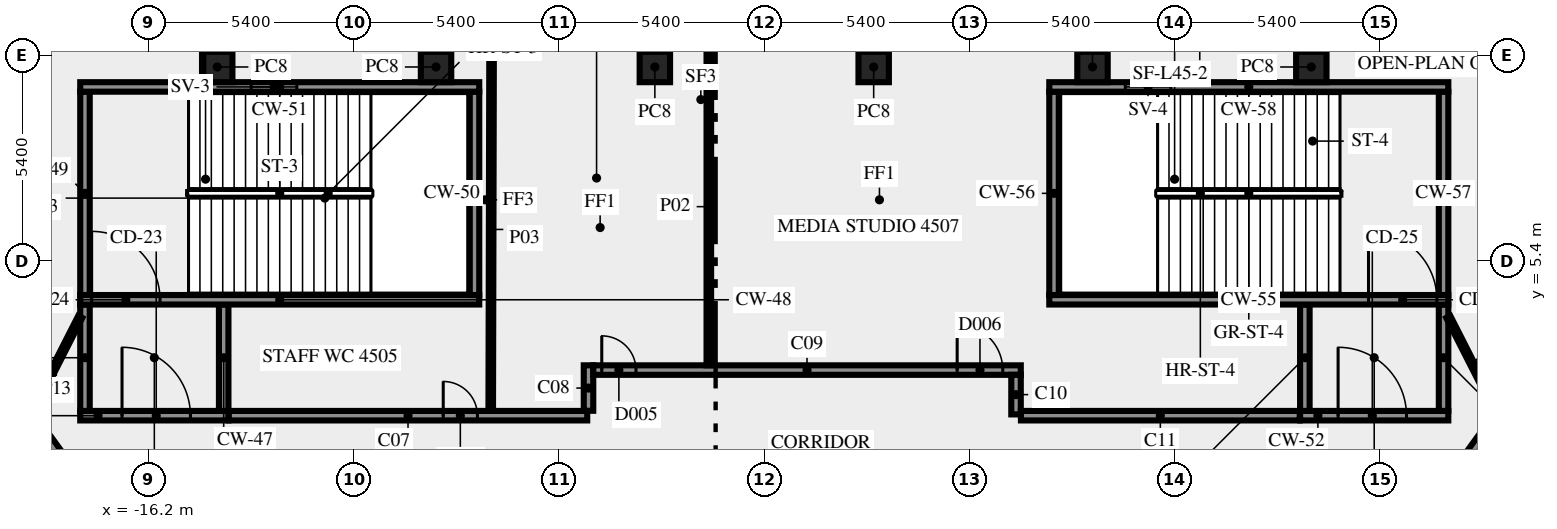
"""IFC4 building model, lengths in metres.
Left out: names, types, materials, properties, quantities, classifications, styles, units other than length and angle.
Written with IfcOpenShell. Run it as: python <this file> out.ifc"""

import sys

from ifc_helpers import new_model, si_unit, direction, frame, frame_2d, origin, origin_2d, place, context, subcontext, project, spatial, rectangle, extrude, element, fill, save


model = new_model("IFC4")
c1 = context("Model", 3, precision=1e-05, world=origin(), true_north=direction((0.0, 1.0)))
c2 = subcontext(c1, "Body", "Model", "MODEL_VIEW")
j1 = project(units=[si_unit("LENGTHUNIT", "METRE"), si_unit("PLANEANGLEUNIT", "RADIAN")], contexts=[c1])
p1 = place(None, origin())
s1 = spatial("IfcSite", under=j1, at=p1, CompositionType="ELEMENT")
p2 = place(p1, origin())
s2 = spatial("IfcBuilding", under=s1, at=p2, CompositionType="ELEMENT")
p3 = place(p2, frame((0.0, 0.0, 194.0)))
s3 = spatial("IfcBuildingStorey", under=s2, at=p3, CompositionType="ELEMENT", Elevation=194.0)
for number, where, z_axis, x_axis in (
    (1, (14.395, 10.5, 0.0), (0.0, 0.0, 1.0), (-1.0, 0.0, 0.0)),
    (2, (8.637, 10.5, 0.0), (0.0, 0.0, 1.0), (-1.0, 0.0, 0.0)),
    (3, (2.879, 10.5, 0.0), (0.0, 0.0, 1.0), (-1.0, 0.0, 0.0)),
    (4, (-2.879, 10.5, 0.0), (0.0, 0.0, 1.0), (-1.0, 0.0, 0.0)),
    (5, (-8.637, 10.5, 0.0), (0.0, 0.0, 1.0), (-1.0, 0.0, 0.0)),
    (6, (-14.395, 10.5, 0.0), (0.0, 0.0, 1.0), (-1.0, 0.0, 0.0)),
):
    element("IfcColumn", number, at=place(p3, frame(where, z_axis=z_axis, x_axis=x_axis)), inside=s3, PredefinedType="COLUMN", context=c2, shape_type="SweptSolid", body=[
        extrude(rectangle(XDim=0.8, YDim=0.8, at=origin_2d()), origin(), (0.0, 0.0, 1.0), 3.65),
    ])
p4 = place(p3, frame((-18.0, 1.325, 0.0), z_axis=(0.0, 0.0, 1.0), x_axis=(1.0, 0.0, 0.0)))
e7 = element("IfcWall", 7, at=p4, inside=s3, PredefinedType="SHEAR", context=c2, shape_type="SweptSolid", body=[
    extrude(rectangle(XDim=3.9, YDim=0.25, at=frame_2d((1.95, 0.0))), origin(), (0.0, 0.0, 1.0), 3.65),
])
p5 = place(p4, frame((1.1, 0.0, 0.0)))
e8 = element("IfcOpeningElement", 8, at=p5, cuts=e7, PredefinedType="OPENING", context=c2, shape_type="SweptSolid", body=[
    extrude(rectangle(XDim=1.8, YDim=2.1, at=frame_2d((0.9, 1.05))), frame((0.0, 0.135, 0.0), z_axis=(0.0, -1.0, 0.0), x_axis=(1.0, 0.0, 0.0)), (0.0, 0.0, 1.0), 0.27),
])
for number, where, z_axis, x_axis in (
    (9, (-17.875, 1.45, 0.0), (0.0, 0.0, 1.0), (0.0, 1.0, 0.0)),
    (10, (-14.225, 1.45, 0.0), (0.0, 0.0, 1.0), (0.0, 1.0, 0.0)),
):
    element("IfcWall", number, at=place(p3, frame(where, z_axis=z_axis, x_axis=x_axis)), inside=s3, PredefinedType="SHEAR", context=c2, shape_type="SweptSolid", body=[
        extrude(rectangle(XDim=2.8, YDim=0.25, at=frame_2d((1.4, 0.0))), origin(), (0.0, 0.0, 1.0), 3.65),
    ])
p6 = place(p3, frame((-18.0, 4.375, 0.0), z_axis=(0.0, 0.0, 1.0), x_axis=(1.0, 0.0, 0.0)))
e11 = element("IfcWall", 11, at=p6, inside=s3, PredefinedType="SHEAR", context=c2, shape_type="SweptSolid", body=[
    extrude(rectangle(XDim=10.5, YDim=0.25, at=frame_2d((5.25, 0.0))), origin(), (0.0, 0.0, 1.0), 3.65),
])
p7 = place(p6, frame((0.3, 0.0, 0.0)))
e12 = element("IfcOpeningElement", 12, at=p7, cuts=e11, PredefinedType="OPENING", context=c2, shape_type="SweptSolid", body=[
    extrude(rectangle(XDim=1.8, YDim=2.1, at=frame_2d((0.9, 1.05))), frame((0.0, 0.135, 0.0), z_axis=(0.0, -1.0, 0.0), x_axis=(1.0, 0.0, 0.0)), (0.0, 0.0, 1.0), 0.27),
])
for number, where, z_axis, x_axis in (
    (13, (-17.875, 4.5, 0.0), (0.0, 0.0, 1.0), (0.0, 1.0, 0.0)),
    (14, (-7.625, 4.5, 0.0), (0.0, 0.0, 1.0), (0.0, 1.0, 0.0)),
):
    element("IfcWall", number, at=place(p3, frame(where, z_axis=z_axis, x_axis=x_axis)), inside=s3, PredefinedType="SHEAR", context=c2, shape_type="SweptSolid", body=[
        extrude(rectangle(XDim=5.35, YDim=0.25, at=frame_2d((2.675, 0.0))), origin(), (0.0, 0.0, 1.0), 3.65),
    ])
p8 = place(p3, frame((-18.0, 9.975, 0.0), z_axis=(0.0, 0.0, 1.0), x_axis=(1.0, 0.0, 0.0)))
e15 = element("IfcWall", 15, at=p8, inside=s3, PredefinedType="SHEAR", context=c2, shape_type="SweptSolid", body=[
    extrude(rectangle(XDim=10.5, YDim=0.25, at=frame_2d((5.25, 0.0))), origin(), (0.0, 0.0, 1.0), 3.65),
])
p9 = place(p8, frame((4.5, 0.0, 1.0)))
e16 = element("IfcOpeningElement", 16, at=p9, cuts=e15, PredefinedType="OPENING", context=c2, shape_type="SweptSolid", body=[
    extrude(rectangle(XDim=1.2, YDim=1.2, at=frame_2d((0.6, 0.6))), frame((0.0, 0.135, 0.0), z_axis=(0.0, -1.0, 0.0), x_axis=(1.0, 0.0, 0.0)), (0.0, 0.0, 1.0), 0.27),
])
p10 = place(p3, frame((14.1, 1.325, 0.0), z_axis=(0.0, 0.0, 1.0), x_axis=(1.0, 0.0, 0.0)))
e17 = element("IfcWall", 17, at=p10, inside=s3, PredefinedType="SHEAR", context=c2, shape_type="SweptSolid", body=[
    extrude(rectangle(XDim=3.9, YDim=0.25, at=frame_2d((1.95, 0.0))), origin(), (0.0, 0.0, 1.0), 3.65),
])
p11 = place(p10, frame((1.0, 0.0, 0.0)))
e18 = element("IfcOpeningElement", 18, at=p11, cuts=e17, PredefinedType="OPENING", context=c2, shape_type="SweptSolid", body=[
    extrude(rectangle(XDim=1.8, YDim=2.1, at=frame_2d((0.9, 1.05))), frame((0.0, 0.135, 0.0), z_axis=(0.0, -1.0, 0.0), x_axis=(1.0, 0.0, 0.0)), (0.0, 0.0, 1.0), 0.27),
])
for number, where, z_axis, x_axis in (
    (19, (14.225, 1.45, 0.0), (0.0, 0.0, 1.0), (0.0, 1.0, 0.0)),
    (20, (17.875, 1.45, 0.0), (0.0, 0.0, 1.0), (0.0, 1.0, 0.0)),
):
    element("IfcWall", number, at=place(p3, frame(where, z_axis=z_axis, x_axis=x_axis)), inside=s3, PredefinedType="SHEAR", context=c2, shape_type="SweptSolid", body=[
        extrude(rectangle(XDim=2.8, YDim=0.25, at=frame_2d((1.4, 0.0))), origin(), (0.0, 0.0, 1.0), 3.65),
    ])
p12 = place(p3, frame((7.5, 4.375, 0.0), z_axis=(0.0, 0.0, 1.0), x_axis=(1.0, 0.0, 0.0)))
e21 = element("IfcWall", 21, at=p12, inside=s3, PredefinedType="SHEAR", context=c2, shape_type="SweptSolid", body=[
    extrude(rectangle(XDim=10.5, YDim=0.25, at=frame_2d((5.25, 0.0))), origin(), (0.0, 0.0, 1.0), 3.65),
])
p13 = place(p12, frame((8.4, 0.0, 0.0)))
e22 = element("IfcOpeningElement", 22, at=p13, cuts=e21, PredefinedType="OPENING", context=c2, shape_type="SweptSolid", body=[
    extrude(rectangle(XDim=1.8, YDim=2.1, at=frame_2d((0.9, 1.05))), frame((0.0, 0.135, 0.0), z_axis=(0.0, -1.0, 0.0), x_axis=(1.0, 0.0, 0.0)), (0.0, 0.0, 1.0), 0.27),
])
for number, where, z_axis, x_axis in (
    (23, (7.625, 4.5, 0.0), (0.0, 0.0, 1.0), (0.0, 1.0, 0.0)),
    (24, (17.875, 4.5, 0.0), (0.0, 0.0, 1.0), (0.0, 1.0, 0.0)),
):
    element("IfcWall", number, at=place(p3, frame(where, z_axis=z_axis, x_axis=x_axis)), inside=s3, PredefinedType="SHEAR", context=c2, shape_type="SweptSolid", body=[
        extrude(rectangle(XDim=5.35, YDim=0.25, at=frame_2d((2.675, 0.0))), origin(), (0.0, 0.0, 1.0), 3.65),
    ])
p14 = place(p3, frame((7.5, 9.975, 0.0), z_axis=(0.0, 0.0, 1.0), x_axis=(1.0, 0.0, 0.0)))
e25 = element("IfcWall", 25, at=p14, inside=s3, PredefinedType="SHEAR", context=c2, shape_type="SweptSolid", body=[
    extrude(rectangle(XDim=10.5, YDim=0.25, at=frame_2d((5.25, 0.0))), origin(), (0.0, 0.0, 1.0), 3.65),
])
p15 = place(p14, frame((2.0, 0.0, 1.0)))
e26 = element("IfcOpeningElement", 26, at=p15, cuts=e25, PredefinedType="OPENING", context=c2, shape_type="SweptSolid", body=[
    extrude(rectangle(XDim=1.2, YDim=1.2, at=frame_2d((0.6, 0.6))), frame((0.0, 0.135, 0.0), z_axis=(0.0, -1.0, 0.0), x_axis=(1.0, 0.0, 0.0)), (0.0, 0.0, 1.0), 0.27),
])
p16 = place(p3, frame((17.545, -1.125, 0.0), z_axis=(0.0, 0.0, 1.0), x_axis=(0.587796810203, 0.809008596935, 0.0)))
e27 = element("IfcWall", 27, at=p16, inside=s3, PredefinedType="SOLIDWALL", context=c2, shape_type="SweptSolid", body=[
    extrude(rectangle(XDim=12.703, YDim=0.25, at=frame_2d((6.352, 0.0))), origin(), (0.0, 0.0, 1.0), 3.65),
])
p17 = place(p16, frame((3.441, 0.0, 0.0)))
e28 = element("IfcOpeningElement", 28, at=p17, cuts=e27, PredefinedType="OPENING", context=c2, shape_type="SweptSolid", body=[
    extrude(rectangle(XDim=0.9, YDim=2.1, at=frame_2d((0.45, 1.05))), frame((0.0, 0.135, 0.0), z_axis=(0.0, -1.0, 0.0), x_axis=(1.0, 0.0, 0.0)), (0.0, 0.0, 1.0), 0.27),
])
p18 = place(p3, frame((-35.092, 23.027, 0.0), z_axis=(0.0, 0.0, 1.0), x_axis=(0.587784076945, -0.809017848313, 0.0)))
e29 = element("IfcWall", 29, at=p18, inside=s3, PredefinedType="SOLIDWALL", context=c2, shape_type="SweptSolid", body=[
    extrude(rectangle(XDim=29.853, YDim=0.25, at=frame_2d((14.927, 0.0))), origin(), (0.0, 0.0, 1.0), 3.65),
])
p19 = place(p18, frame((10.095, 0.0, 0.0)))
e30 = element("IfcOpeningElement", 30, at=p19, cuts=e29, PredefinedType="OPENING", context=c2, shape_type="SweptSolid", body=[
    extrude(rectangle(XDim=0.9, YDim=2.1, at=frame_2d((0.45, 1.05))), frame((0.0, 0.135, 0.0), z_axis=(0.0, -1.0, 0.0), x_axis=(1.0, 0.0, 0.0)), (0.0, 0.0, 1.0), 0.27),
])
p20 = place(p18, frame((15.495, 0.0, 0.0)))
e31 = element("IfcOpeningElement", 31, at=p20, cuts=e29, PredefinedType="OPENING", context=c2, shape_type="SweptSolid", body=[
    extrude(rectangle(XDim=0.9, YDim=2.1, at=frame_2d((0.45, 1.05))), frame((0.0, 0.135, 0.0), z_axis=(0.0, -1.0, 0.0), x_axis=(1.0, 0.0, 0.0)), (0.0, 0.0, 1.0), 0.27),
])
p21 = place(p18, frame((0.224, 0.0, 0.0)))
e32 = element("IfcOpeningElement", 32, at=p21, cuts=e29, PredefinedType="OPENING", context=c2, shape_type="SweptSolid", body=[
    extrude(rectangle(XDim=0.9, YDim=2.1, at=frame_2d((0.45, 1.05))), frame((0.0, 0.135, 0.0), z_axis=(0.0, -1.0, 0.0), x_axis=(1.0, 0.0, 0.0)), (0.0, 0.0, 1.0), 0.27),
])
p22 = place(p3, frame((-14.09, 1.325, 0.0), z_axis=(0.0, 0.0, 1.0), x_axis=(1.0, 0.0, 0.0)))
e33 = element("IfcWall", 33, at=p22, inside=s3, PredefinedType="SOLIDWALL", context=c2, shape_type="SweptSolid", body=[
    extrude(rectangle(XDim=9.431, YDim=0.25, at=frame_2d((4.716, 0.0))), origin(), (0.0, 0.0, 1.0), 3.65),
])
p23 = place(p22, frame((5.642, 0.0, 0.0)))
e34 = element("IfcOpeningElement", 34, at=p23, cuts=e33, PredefinedType="OPENING", context=c2, shape_type="SweptSolid", body=[
    extrude(rectangle(XDim=0.9, YDim=2.1, at=frame_2d((0.45, 1.05))), frame((0.0, 0.135, 0.0), z_axis=(0.0, -1.0, 0.0), x_axis=(1.0, 0.0, 0.0)), (0.0, 0.0, 1.0), 0.27),
])
p24 = place(p3, frame((-4.625, 1.454, 0.0), z_axis=(0.0, 0.0, 1.0), x_axis=(0.0, 1.0, 0.0)))
e35 = element("IfcWall", 35, at=p24, inside=s3, PredefinedType="SOLIDWALL", context=c2, shape_type="SweptSolid", body=[
    extrude(rectangle(XDim=1.196, YDim=0.25, at=frame_2d((0.598, 0.0))), origin(), (0.0, 0.0, 1.0), 3.65),
])
p25 = place(p3, frame((-4.5, 2.525, 0.0), z_axis=(0.0, 0.0, 1.0), x_axis=(1.0, 0.0, 0.0)))
e36 = element("IfcWall", 36, at=p25, inside=s3, PredefinedType="SOLIDWALL", context=c2, shape_type="SweptSolid", body=[
    extrude(rectangle(XDim=11.25, YDim=0.25, at=frame_2d((5.625, 0.0))), origin(), (0.0, 0.0, 1.0), 3.65),
])
p26 = place(p25, frame((0.224, 0.0, 0.0)))
e37 = element("IfcOpeningElement", 37, at=p26, cuts=e36, PredefinedType="OPENING", context=c2, shape_type="SweptSolid", body=[
    extrude(rectangle(XDim=0.9, YDim=2.1, at=frame_2d((0.45, 1.05))), frame((0.0, 0.135, 0.0), z_axis=(0.0, -1.0, 0.0), x_axis=(1.0, 0.0, 0.0)), (0.0, 0.0, 1.0), 0.27),
])
p27 = place(p25, frame((9.576, 0.0, 0.0)))
e38 = element("IfcOpeningElement", 38, at=p27, cuts=e36, PredefinedType="OPENING", context=c2, shape_type="SweptSolid", body=[
    extrude(rectangle(XDim=1.2, YDim=2.1, at=frame_2d((0.6, 1.05))), frame((0.0, 0.135, 0.0), z_axis=(0.0, -1.0, 0.0), x_axis=(1.0, 0.0, 0.0)), (0.0, 0.0, 1.0), 0.27),
])
p28 = place(p3, frame((6.625, 2.4, 0.0), z_axis=(0.0, 0.0, 1.0), x_axis=(0.0, -1.0, 0.0)))
e39 = element("IfcWall", 39, at=p28, inside=s3, PredefinedType="SOLIDWALL", context=c2, shape_type="SweptSolid", body=[
    extrude(rectangle(XDim=1.041, YDim=0.25, at=frame_2d((0.521, 0.0))), origin(), (0.0, 0.0, 1.0), 3.65),
])
p29 = place(p3, frame((6.754, 1.325, 0.0), z_axis=(0.0, 0.0, 1.0), x_axis=(1.0, 0.0, 0.0)))
e40 = element("IfcWall", 40, at=p29, inside=s3, PredefinedType="SOLIDWALL", context=c2, shape_type="SweptSolid", body=[
    extrude(rectangle(XDim=7.336, YDim=0.25, at=frame_2d((3.668, 0.0))), origin(), (0.0, 0.0, 1.0), 3.65),
])
p30 = place(p3, frame((24.898, 9.209, 0.0), z_axis=(0.0, 0.0, 1.0), x_axis=(-0.809013490065, 0.587790075531, 0.0)))
e41 = element("IfcWall", 41, at=p30, inside=s3, PredefinedType="PARTITIONING", context=c2, shape_type="SweptSolid", body=[
    extrude(rectangle(XDim=9.549, YDim=0.15, at=frame_2d((4.775, 0.0))), origin(), (0.0, 0.0, 1.0), 2.85),
])
p31 = place(p3, frame((-1.459, 2.65, 0.0), z_axis=(0.0, 0.0, 1.0), x_axis=(0.0, 1.0, 0.0)))
e42 = element("IfcWall", 42, at=p31, inside=s3, PredefinedType="PARTITIONING", context=c2, shape_type="SweptSolid", body=[
    extrude(rectangle(XDim=8.35, YDim=0.12, at=frame_2d((4.175, 0.0))), origin(), (0.0, 0.0, 1.0), 2.85),
])
p32 = place(p3, frame((-7.175, 11.0, 0.0), z_axis=(0.0, 0.0, 1.0), x_axis=(-0.002377476217, -0.999997173799, 0.0)))
e43 = element("IfcWall", 43, at=p32, inside=s3, PredefinedType="PARTITIONING", context=c2, shape_type="SweptSolid", body=[
    extrude(rectangle(XDim=9.55, YDim=0.12, at=frame_2d((4.775, 0.0))), origin(), (0.0, 0.0, 1.0), 2.85),
])
p33 = place(p3, frame((-26.089, 10.848, 0.0), z_axis=(0.0, 0.0, 1.0), x_axis=(0.807661302092, 0.589646691759, 0.0)))
e44 = element("IfcWall", 44, at=p33, inside=s3, PredefinedType="SOLIDWALL", context=c2, shape_type="SweptSolid", body=[
    extrude(rectangle(XDim=9.55, YDim=0.2, at=frame_2d((4.775, 0.0))), origin(), (0.0, 0.0, 1.0), 2.85),
])
for number, where, z_axis, x_axis in (
    (45, (18.0, 3.925, 0.0), (0.0, 0.0, 1.0), (0.454, -0.891, 0.0)),
    (46, (-19.261, 1.45, 0.0), (0.0, 0.0, 1.0), (0.454, 0.891, 0.0)),
):
    element("IfcWall", number, at=place(p3, frame(where, z_axis=z_axis, x_axis=x_axis)), inside=s3, PredefinedType="PARTITIONING", context=c2, shape_type="SweptSolid", body=[
        extrude(rectangle(XDim=2.778, YDim=0.12, at=frame_2d((1.389, 0.0))), origin(), (0.0, 0.0, 1.0), 3.65),
    ])
p34 = place(p5, origin())
e47 = element("IfcDoor", 47, at=p34, inside=s3, OperationType="DOUBLE_DOOR_SINGLE_SWING", PredefinedType="DOOR", context=c2, shape_type="SweptSolid", body=[
    extrude(rectangle(XDim=1.8, YDim=2.1, at=frame_2d((0.9, 1.05))), frame((0.0, 0.025, 0.0), z_axis=(0.0, -1.0, 0.0), x_axis=(1.0, 0.0, 0.0)), (0.0, 0.0, 1.0), 0.05),
])
fill(e8, e47)
p35 = place(p7, origin())
e48 = element("IfcDoor", 48, at=p35, inside=s3, OperationType="DOUBLE_DOOR_SINGLE_SWING", PredefinedType="DOOR", context=c2, shape_type="SweptSolid", body=[
    extrude(rectangle(XDim=1.8, YDim=2.1, at=frame_2d((0.9, 1.05))), frame((0.0, 0.025, 0.0), z_axis=(0.0, -1.0, 0.0), x_axis=(1.0, 0.0, 0.0)), (0.0, 0.0, 1.0), 0.05),
])
fill(e12, e48)
p36 = place(p9, origin())
e49 = element("IfcWindow", 49, at=p36, inside=s3, PartitioningType="SINGLE_PANEL", PredefinedType="WINDOW", context=c2, shape_type="SweptSolid", body=[
    extrude(rectangle(XDim=1.2, YDim=1.2, at=frame_2d((0.6, 0.6))), frame((0.0, 0.03, 0.0), z_axis=(0.0, -1.0, 0.0), x_axis=(1.0, 0.0, 0.0)), (0.0, 0.0, 1.0), 0.06),
])
fill(e16, e49)
p37 = place(p11, origin())
e50 = element("IfcDoor", 50, at=p37, inside=s3, OperationType="DOUBLE_DOOR_SINGLE_SWING", PredefinedType="DOOR", context=c2, shape_type="SweptSolid", body=[
    extrude(rectangle(XDim=1.8, YDim=2.1, at=frame_2d((0.9, 1.05))), frame((0.0, 0.025, 0.0), z_axis=(0.0, -1.0, 0.0), x_axis=(1.0, 0.0, 0.0)), (0.0, 0.0, 1.0), 0.05),
])
fill(e18, e50)
p38 = place(p13, origin())
e51 = element("IfcDoor", 51, at=p38, inside=s3, OperationType="DOUBLE_DOOR_SINGLE_SWING", PredefinedType="DOOR", context=c2, shape_type="SweptSolid", body=[
    extrude(rectangle(XDim=1.8, YDim=2.1, at=frame_2d((0.9, 1.05))), frame((0.0, 0.025, 0.0), z_axis=(0.0, -1.0, 0.0), x_axis=(1.0, 0.0, 0.0)), (0.0, 0.0, 1.0), 0.05),
])
fill(e22, e51)
p39 = place(p15, origin())
e52 = element("IfcWindow", 52, at=p39, inside=s3, PartitioningType="SINGLE_PANEL", PredefinedType="WINDOW", context=c2, shape_type="SweptSolid", body=[
    extrude(rectangle(XDim=1.2, YDim=1.2, at=frame_2d((0.6, 0.6))), frame((0.0, 0.03, 0.0), z_axis=(0.0, -1.0, 0.0), x_axis=(1.0, 0.0, 0.0)), (0.0, 0.0, 1.0), 0.06),
])
fill(e26, e52)
p40 = place(p26, origin())
e53 = element("IfcDoor", 53, at=p40, inside=s3, OperationType="SINGLE_SWING_LEFT", PredefinedType="DOOR", context=c2, shape_type="SweptSolid", body=[
    extrude(rectangle(XDim=0.9, YDim=2.1, at=frame_2d((0.45, 1.05))), frame((0.0, 0.025, 0.0), z_axis=(0.0, -1.0, 0.0), x_axis=(1.0, 0.0, 0.0)), (0.0, 0.0, 1.0), 0.05),
])
fill(e37, e53)
p41 = place(p27, origin())
e54 = element("IfcDoor", 54, at=p41, inside=s3, OperationType="SINGLE_SWING_RIGHT", PredefinedType="DOOR", context=c2, shape_type="SweptSolid", body=[
    extrude(rectangle(XDim=1.2, YDim=2.1, at=frame_2d((0.6, 1.05))), frame((0.0, 0.025, 0.0), z_axis=(0.0, -1.0, 0.0), x_axis=(1.0, 0.0, 0.0)), (0.0, 0.0, 1.0), 0.05),
])
fill(e38, e54)
p42 = place(p23, origin())
e55 = element("IfcDoor", 55, at=p42, inside=s3, OperationType="SINGLE_SWING_RIGHT", PredefinedType="DOOR", context=c2, shape_type="SweptSolid", body=[
    extrude(rectangle(XDim=0.9, YDim=2.1, at=frame_2d((0.45, 1.05))), frame((0.0, 0.025, 0.0), z_axis=(0.0, -1.0, 0.0), x_axis=(1.0, 0.0, 0.0)), (0.0, 0.0, 1.0), 0.05),
])
fill(e34, e55)
save(model, sys.argv[1])
